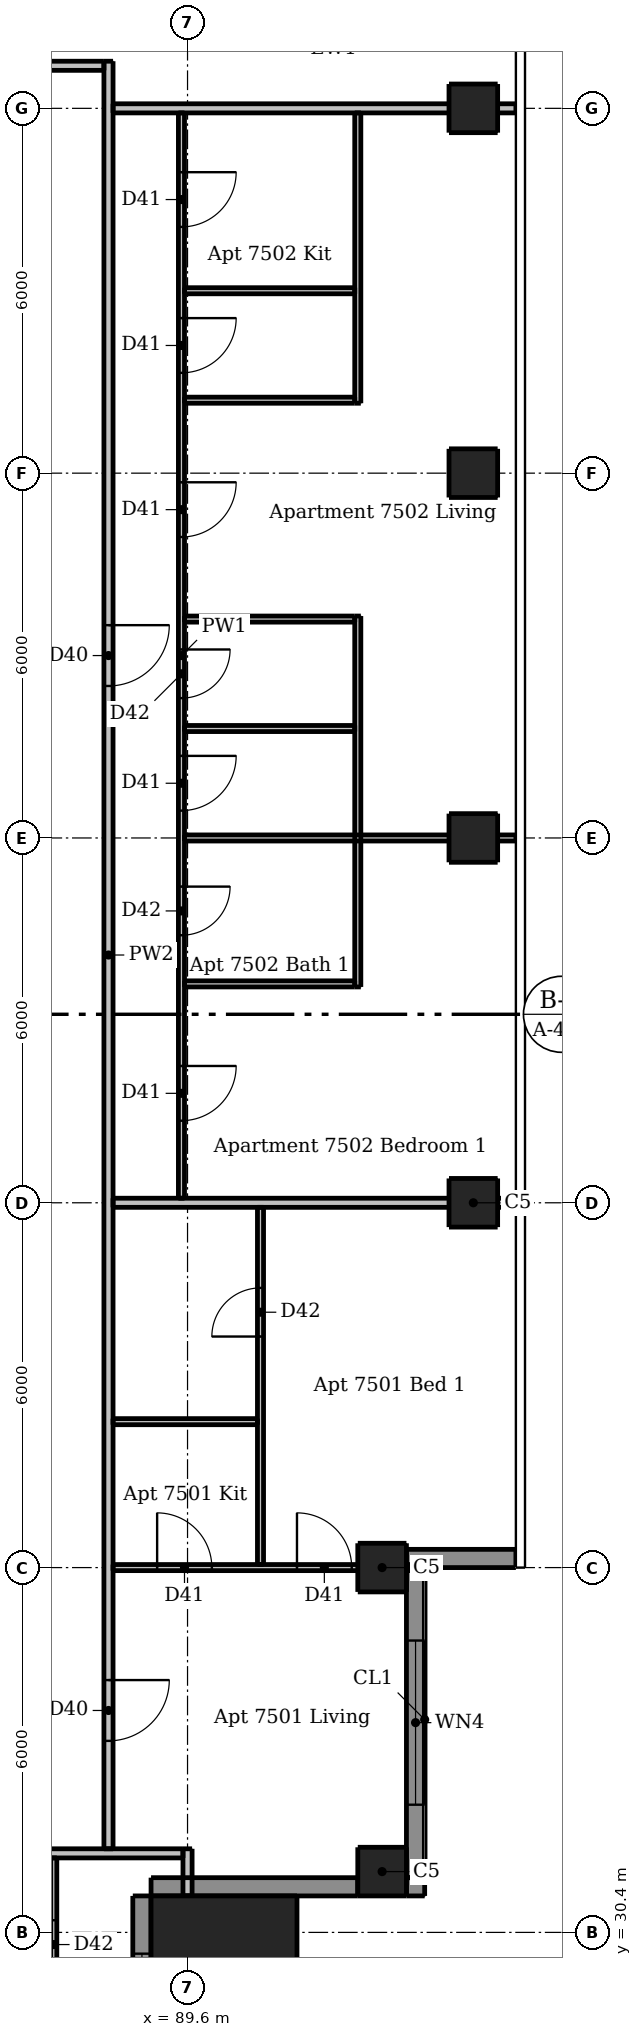
"""IFC4 building model, lengths in metres.
Left out: names, types, materials, properties, quantities, classifications, styles, units other than length and angle.
Written with IfcOpenShell. Run it as: python <this file> out.ifc"""

import sys

from ifc_helpers import new_model, si_unit, direction, frame, frame_2d, origin, origin_2d, place, context, subcontext, project, spatial, rectangle, extrude, element, fill, save


model = new_model("IFC4")
c1 = context("Model", 3, precision=1e-05, world=origin(), true_north=direction((0.0, 1.0)))
c2 = subcontext(c1, "Body", "Model", "MODEL_VIEW")
j1 = project(units=[si_unit("LENGTHUNIT", "METRE"), si_unit("PLANEANGLEUNIT", "RADIAN")], contexts=[c1])
p1 = place(None, origin())
s1 = spatial("IfcSite", under=j1, at=p1, CompositionType="ELEMENT")
p2 = place(p1, origin())
s2 = spatial("IfcBuilding", under=s1, at=p2, CompositionType="ELEMENT")
p3 = place(p2, frame((0.0, 0.0, 278.5)))
s3 = spatial("IfcBuildingStorey", under=s2, at=p3, CompositionType="ELEMENT", Elevation=278.5)
for number, where, z_axis, x_axis in (
    (1, (92.8, 31.4, 0.0), (0.0, 0.0, 1.0), (1.0, 0.0, 0.0)),
    (2, (92.8, 36.4, 0.0), (0.0, 0.0, 1.0), (1.0, 0.0, 0.0)),
    (3, (94.3, 42.4, 0.0), (0.0, 0.0, 1.0), (1.0, 0.0, 0.0)),
    (4, (94.3, 48.4, 0.0), (0.0, 0.0, 1.0), (1.0, 0.0, 0.0)),
    (5, (94.3, 54.4, 0.0), (0.0, 0.0, 1.0), (1.0, 0.0, 0.0)),
    (6, (94.3, 60.4, 0.0), (0.0, 0.0, 1.0), (1.0, 0.0, 0.0)),
):
    element("IfcColumn", number, at=place(p3, frame(where, z_axis=z_axis, x_axis=x_axis)), inside=s3, PredefinedType="COLUMN", context=c2, shape_type="SweptSolid", body=[
        extrude(rectangle(XDim=0.8, YDim=0.8, at=origin_2d()), origin(), (0.0, 0.0, 1.0), 3.0),
    ])
p4 = place(p3, frame((90.2, 29.8, 0.0), z_axis=(0.0, 0.0, 1.0), x_axis=(1.0, 0.0, 0.0)))
e7 = element("IfcColumn", 7, at=p4, inside=s3, PredefinedType="COLUMN", context=c2, shape_type="SweptSolid", body=[
    extrude(rectangle(XDim=2.4, YDim=2.4, at=origin_2d()), origin(), (0.0, 0.0, 1.0), 3.3),
])
p5 = place(p3, frame((88.85, 27.6, 0.0), z_axis=(0.0, 0.0, 1.0), x_axis=(0.0, 1.0, 0.0)))
e8 = element("IfcWall", 8, at=p5, inside=s3, PredefinedType="SOLIDWALL", context=c2, shape_type="SweptSolid", body=[
    extrude(rectangle(XDim=3.4, YDim=0.3, at=frame_2d((1.7, 0.0))), origin(), (0.0, 0.0, 1.0), 3.0),
])
p6 = place(p5, frame((0.95, 0.0, 0.9)))
e9 = element("IfcOpeningElement", 9, at=p6, cuts=e8, PredefinedType="OPENING", context=c2, shape_type="SweptSolid", body=[
    extrude(rectangle(XDim=1.5, YDim=1.5, at=frame_2d((0.75, 0.75))), frame((0.0, 0.16, 0.0), z_axis=(0.0, -1.0, 0.0), x_axis=(1.0, 0.0, 0.0)), (0.0, 0.0, 1.0), 0.32),
])
p7 = place(p3, frame((89.0, 31.15, 0.0), z_axis=(0.0, 0.0, 1.0), x_axis=(1.0, 0.0, 0.0)))
e10 = element("IfcWall", 10, at=p7, inside=s3, PredefinedType="SOLIDWALL", context=c2, shape_type="SweptSolid", body=[
    extrude(rectangle(XDim=3.4, YDim=0.3, at=frame_2d((1.7, 0.0))), origin(), (0.0, 0.0, 1.0), 3.0),
])
p8 = place(p3, frame((93.2, 31.15, 0.0), z_axis=(0.0, 0.0, 1.0), x_axis=(1.0, 0.0, 0.0)))
e11 = element("IfcWall", 11, at=p8, inside=s3, PredefinedType="SOLIDWALL", context=c2, shape_type="SweptSolid", body=[
    extrude(rectangle(XDim=0.3, YDim=0.3, at=frame_2d((0.15, 0.0))), origin(), (0.0, 0.0, 1.0), 3.0),
])
p9 = place(p3, frame((93.2, 36.55, 0.0), z_axis=(0.0, 0.0, 1.0), x_axis=(1.0, 0.0, 0.0)))
e12 = element("IfcWall", 12, at=p9, inside=s3, PredefinedType="SOLIDWALL", context=c2, shape_type="SweptSolid", body=[
    extrude(rectangle(XDim=1.8, YDim=0.3, at=frame_2d((0.9, 0.0))), origin(), (0.0, 0.0, 1.0), 3.0),
])
p10 = place(p3, frame((93.35, 31.3, 0.0), z_axis=(0.0, 0.0, 1.0), x_axis=(0.0, 1.0, 0.0)))
e13 = element("IfcWall", 13, at=p10, inside=s3, PredefinedType="SOLIDWALL", context=c2, shape_type="SweptSolid", body=[
    extrude(rectangle(XDim=5.1, YDim=0.3, at=frame_2d((2.55, 0.0))), origin(), (0.0, 0.0, 1.0), 3.0),
])
p11 = place(p10, frame((1.2, 0.0, 0.15)))
e14 = element("IfcOpeningElement", 14, at=p11, cuts=e13, PredefinedType="OPENING", context=c2, shape_type="SweptSolid", body=[
    extrude(rectangle(XDim=2.7, YDim=2.1, at=frame_2d((1.35, 1.05))), frame((0.0, 0.16, 0.0), z_axis=(0.0, -1.0, 0.0), x_axis=(1.0, 0.0, 0.0)), (0.0, 0.0, 1.0), 0.32),
])
p12 = place(p3, frame((87.4, 28.65, 0.0), z_axis=(0.0, 0.0, 1.0), x_axis=(0.0, 1.0, 0.0)))
e15 = element("IfcWall", 15, at=p12, inside=s3, PredefinedType="PARTITIONING", context=c2, shape_type="SweptSolid", body=[
    extrude(rectangle(XDim=2.975, YDim=0.1, at=frame_2d((1.488, 0.0))), origin(), (0.0, 0.0, 1.0), 3.0),
])
p13 = place(p12, frame((1.15, 0.0, 0.0)))
e16 = element("IfcOpeningElement", 16, at=p13, cuts=e15, PredefinedType="OPENING", context=c2, shape_type="SweptSolid", body=[
    extrude(rectangle(XDim=0.8, YDim=2.1, at=frame_2d((0.4, 1.05))), frame((0.0, 0.06, 0.0), z_axis=(0.0, -1.0, 0.0), x_axis=(1.0, 0.0, 0.0)), (0.0, 0.0, 1.0), 0.12),
])
p14 = place(p3, frame((89.5, 60.325, 0.0), z_axis=(0.0, 0.0, 1.0), x_axis=(0.0, -1.0, 0.0)))
e17 = element("IfcWall", 17, at=p14, inside=s3, PredefinedType="PARTITIONING", context=c2, shape_type="SweptSolid", body=[
    extrude(rectangle(XDim=17.85, YDim=0.1, at=frame_2d((8.925, 0.0))), origin(), (0.0, 0.0, 1.0), 3.0),
])
p15 = place(p14, frame((6.075, 0.0, 0.0)))
e18 = element("IfcOpeningElement", 18, at=p15, cuts=e17, PredefinedType="OPENING", context=c2, shape_type="SweptSolid", body=[
    extrude(rectangle(XDim=0.9, YDim=2.1, at=frame_2d((0.45, 1.05))), frame((0.0, 0.06, 0.0), z_axis=(0.0, -1.0, 0.0), x_axis=(1.0, 0.0, 0.0)), (0.0, 0.0, 1.0), 0.12),
])
p16 = place(p14, frame((0.975, 0.0, 0.0)))
e19 = element("IfcOpeningElement", 19, at=p16, cuts=e17, PredefinedType="OPENING", context=c2, shape_type="SweptSolid", body=[
    extrude(rectangle(XDim=0.9, YDim=2.1, at=frame_2d((0.45, 1.05))), frame((0.0, 0.06, 0.0), z_axis=(0.0, -1.0, 0.0), x_axis=(1.0, 0.0, 0.0)), (0.0, 0.0, 1.0), 0.12),
])
p17 = place(p14, frame((3.375, 0.0, 0.0)))
e20 = element("IfcOpeningElement", 20, at=p17, cuts=e17, PredefinedType="OPENING", context=c2, shape_type="SweptSolid", body=[
    extrude(rectangle(XDim=0.9, YDim=2.1, at=frame_2d((0.45, 1.05))), frame((0.0, 0.06, 0.0), z_axis=(0.0, -1.0, 0.0), x_axis=(1.0, 0.0, 0.0)), (0.0, 0.0, 1.0), 0.12),
])
p18 = place(p14, frame((10.575, 0.0, 0.0)))
e21 = element("IfcOpeningElement", 21, at=p18, cuts=e17, PredefinedType="OPENING", context=c2, shape_type="SweptSolid", body=[
    extrude(rectangle(XDim=0.9, YDim=2.1, at=frame_2d((0.45, 1.05))), frame((0.0, 0.06, 0.0), z_axis=(0.0, -1.0, 0.0), x_axis=(1.0, 0.0, 0.0)), (0.0, 0.0, 1.0), 0.12),
])
p19 = place(p14, frame((8.825, 0.0, 0.0)))
e22 = element("IfcOpeningElement", 22, at=p19, cuts=e17, PredefinedType="OPENING", context=c2, shape_type="SweptSolid", body=[
    extrude(rectangle(XDim=0.8, YDim=2.1, at=frame_2d((0.4, 1.05))), frame((0.0, 0.06, 0.0), z_axis=(0.0, -1.0, 0.0), x_axis=(1.0, 0.0, 0.0)), (0.0, 0.0, 1.0), 0.12),
])
p20 = place(p14, frame((15.675, 0.0, 0.0)))
e23 = element("IfcOpeningElement", 23, at=p20, cuts=e17, PredefinedType="OPENING", context=c2, shape_type="SweptSolid", body=[
    extrude(rectangle(XDim=0.9, YDim=2.1, at=frame_2d((0.45, 1.05))), frame((0.0, 0.06, 0.0), z_axis=(0.0, -1.0, 0.0), x_axis=(1.0, 0.0, 0.0)), (0.0, 0.0, 1.0), 0.12),
])
p21 = place(p14, frame((12.725, 0.0, 0.0)))
e24 = element("IfcOpeningElement", 24, at=p21, cuts=e17, PredefinedType="OPENING", context=c2, shape_type="SweptSolid", body=[
    extrude(rectangle(XDim=0.8, YDim=2.1, at=frame_2d((0.4, 1.05))), frame((0.0, 0.06, 0.0), z_axis=(0.0, -1.0, 0.0), x_axis=(1.0, 0.0, 0.0)), (0.0, 0.0, 1.0), 0.12),
])
p22 = place(p3, frame((90.8, 36.45, 0.0), z_axis=(0.0, 0.0, 1.0), x_axis=(0.0, 1.0, 0.0)))
e25 = element("IfcWall", 25, at=p22, inside=s3, PredefinedType="PARTITIONING", context=c2, shape_type="SweptSolid", body=[
    extrude(rectangle(XDim=5.875, YDim=0.1, at=frame_2d((2.938, 0.0))), origin(), (0.0, 0.0, 1.0), 3.0),
])
p23 = place(p22, frame((3.75, 0.0, 0.0)))
e26 = element("IfcOpeningElement", 26, at=p23, cuts=e25, PredefinedType="OPENING", context=c2, shape_type="SweptSolid", body=[
    extrude(rectangle(XDim=0.8, YDim=2.1, at=frame_2d((0.4, 1.05))), frame((0.0, 0.06, 0.0), z_axis=(0.0, -1.0, 0.0), x_axis=(1.0, 0.0, 0.0)), (0.0, 0.0, 1.0), 0.12),
])
p24 = place(p3, frame((92.4, 45.95, 0.0), z_axis=(0.0, 0.0, 1.0), x_axis=(0.0, 1.0, 0.0)))
e27 = element("IfcWall", 27, at=p24, inside=s3, PredefinedType="PARTITIONING", context=c2, shape_type="SweptSolid", body=[
    extrude(rectangle(XDim=6.1, YDim=0.1, at=frame_2d((3.05, 0.0))), origin(), (0.0, 0.0, 1.0), 3.0),
])
p25 = place(p3, frame((92.4, 55.55, 0.0), z_axis=(0.0, 0.0, 1.0), x_axis=(0.0, 1.0, 0.0)))
e28 = element("IfcWall", 28, at=p25, inside=s3, PredefinedType="PARTITIONING", context=c2, shape_type="SweptSolid", body=[
    extrude(rectangle(XDim=4.775, YDim=0.1, at=frame_2d((2.387, 0.0))), origin(), (0.0, 0.0, 1.0), 3.0),
])
for number, where, z_axis, x_axis in (
    (29, (89.55, 57.4, 0.0), (0.0, 0.0, 1.0), (1.0, 0.0, 0.0)),
    (30, (89.55, 55.6, 0.0), (0.0, 0.0, 1.0), (1.0, 0.0, 0.0)),
    (31, (89.55, 52.0, 0.0), (0.0, 0.0, 1.0), (1.0, 0.0, 0.0)),
    (32, (89.55, 50.2, 0.0), (0.0, 0.0, 1.0), (1.0, 0.0, 0.0)),
):
    element("IfcWall", number, at=place(p3, frame(where, z_axis=z_axis, x_axis=x_axis)), inside=s3, PredefinedType="PARTITIONING", context=c2, shape_type="SweptSolid", body=[
        extrude(rectangle(XDim=2.8, YDim=0.1, at=frame_2d((1.4, 0.0))), origin(), (0.0, 0.0, 1.0), 3.0),
    ])
p26 = place(p3, frame((89.55, 48.4, 0.0), z_axis=(0.0, 0.0, 1.0), x_axis=(1.0, 0.0, 0.0)))
e33 = element("IfcWall", 33, at=p26, inside=s3, PredefinedType="PARTITIONING", context=c2, shape_type="SweptSolid", body=[
    extrude(rectangle(XDim=5.45, YDim=0.1, at=frame_2d((2.725, 0.0))), origin(), (0.0, 0.0, 1.0), 2.539),
])
p27 = place(p3, frame((89.55, 46.0, 0.0), z_axis=(0.0, 0.0, 1.0), x_axis=(1.0, 0.0, 0.0)))
e34 = element("IfcWall", 34, at=p27, inside=s3, PredefinedType="PARTITIONING", context=c2, shape_type="SweptSolid", body=[
    extrude(rectangle(XDim=2.8, YDim=0.1, at=frame_2d((1.4, 0.0))), origin(), (0.0, 0.0, 1.0), 3.0),
])
p28 = place(p3, frame((88.375, 38.8, 0.0), z_axis=(0.0, 0.0, 1.0), x_axis=(1.0, 0.0, 0.0)))
e35 = element("IfcWall", 35, at=p28, inside=s3, PredefinedType="PARTITIONING", context=c2, shape_type="SweptSolid", body=[
    extrude(rectangle(XDim=2.375, YDim=0.1, at=frame_2d((1.188, 0.0))), origin(), (0.0, 0.0, 1.0), 3.0),
])
p29 = place(p3, frame((88.375, 36.4, 0.0), z_axis=(0.0, 0.0, 1.0), x_axis=(1.0, 0.0, 0.0)))
e36 = element("IfcWall", 36, at=p29, inside=s3, PredefinedType="PARTITIONING", context=c2, shape_type="SweptSolid", body=[
    extrude(rectangle(XDim=5.125, YDim=0.1, at=frame_2d((2.562, 0.0))), origin(), (0.0, 0.0, 1.0), 2.597),
])
p30 = place(p29, frame((0.725, 0.0, 0.0)))
e37 = element("IfcOpeningElement", 37, at=p30, cuts=e36, PredefinedType="OPENING", context=c2, shape_type="SweptSolid", body=[
    extrude(rectangle(XDim=0.9, YDim=2.1, at=frame_2d((0.45, 1.05))), frame((0.0, 0.06, 0.0), z_axis=(0.0, -1.0, 0.0), x_axis=(1.0, 0.0, 0.0)), (0.0, 0.0, 1.0), 0.12),
])
p31 = place(p29, frame((3.025, 0.0, 0.0)))
e38 = element("IfcOpeningElement", 38, at=p31, cuts=e36, PredefinedType="OPENING", context=c2, shape_type="SweptSolid", body=[
    extrude(rectangle(XDim=0.9, YDim=2.1, at=frame_2d((0.45, 1.05))), frame((0.0, 0.06, 0.0), z_axis=(0.0, -1.0, 0.0), x_axis=(1.0, 0.0, 0.0)), (0.0, 0.0, 1.0), 0.12),
])
p32 = place(p3, frame((88.3, 61.175, 0.0), z_axis=(0.0, 0.0, 1.0), x_axis=(0.0, -1.0, 0.0)))
e39 = element("IfcWall", 39, at=p32, inside=s3, PredefinedType="PARTITIONING", context=c2, shape_type="SweptSolid", body=[
    extrude(rectangle(XDim=29.4, YDim=0.15, at=frame_2d((14.7, 0.0))), origin(), (0.0, 0.0, 1.0), 3.0),
])
p33 = place(p32, frame((26.625, 0.0, 0.0)))
e40 = element("IfcOpeningElement", 40, at=p33, cuts=e39, PredefinedType="OPENING", context=c2, shape_type="SweptSolid", body=[
    extrude(rectangle(XDim=1.0, YDim=2.1, at=frame_2d((0.5, 1.05))), frame((0.0, 0.085, 0.0), z_axis=(0.0, -1.0, 0.0), x_axis=(1.0, 0.0, 0.0)), (0.0, 0.0, 1.0), 0.17),
])
p34 = place(p32, frame((9.275, 0.0, 0.0)))
e41 = element("IfcOpeningElement", 41, at=p34, cuts=e39, PredefinedType="OPENING", context=c2, shape_type="SweptSolid", body=[
    extrude(rectangle(XDim=1.0, YDim=2.1, at=frame_2d((0.5, 1.05))), frame((0.0, 0.085, 0.0), z_axis=(0.0, -1.0, 0.0), x_axis=(1.0, 0.0, 0.0)), (0.0, 0.0, 1.0), 0.17),
])
p35 = place(p3, frame((89.6, 31.0, 0.0), z_axis=(0.0, 0.0, 1.0), x_axis=(0.0, 1.0, 0.0)))
e42 = element("IfcWall", 42, at=p35, inside=s3, PredefinedType="PARTITIONING", context=c2, shape_type="SweptSolid", body=[
    extrude(rectangle(XDim=0.775, YDim=0.15, at=frame_2d((0.387, 0.0))), origin(), (0.0, 0.0, 1.0), 3.0),
])
p36 = place(p3, frame((58.975, 61.1, 0.0), z_axis=(0.0, 0.0, 1.0), x_axis=(1.0, 0.0, 0.0)))
e43 = element("IfcWall", 43, at=p36, inside=s3, PredefinedType="PARTITIONING", context=c2, shape_type="SweptSolid", body=[
    extrude(rectangle(XDim=29.25, YDim=0.15, at=frame_2d((14.625, 0.0))), origin(), (0.0, 0.0, 1.0), 3.0),
])
p37 = place(p36, frame((9.125, 0.0, 0.0)))
e44 = element("IfcOpeningElement", 44, at=p37, cuts=e43, PredefinedType="OPENING", context=c2, shape_type="SweptSolid", body=[
    extrude(rectangle(XDim=1.0, YDim=2.1, at=frame_2d((0.5, 1.05))), frame((0.0, 0.085, 0.0), z_axis=(0.0, -1.0, 0.0), x_axis=(1.0, 0.0, 0.0)), (0.0, 0.0, 1.0), 0.17),
])
p38 = place(p36, frame((26.475, 0.0, 0.0)))
e45 = element("IfcOpeningElement", 45, at=p38, cuts=e43, PredefinedType="OPENING", context=c2, shape_type="SweptSolid", body=[
    extrude(rectangle(XDim=1.0, YDim=2.1, at=frame_2d((0.5, 1.05))), frame((0.0, 0.085, 0.0), z_axis=(0.0, -1.0, 0.0), x_axis=(1.0, 0.0, 0.0)), (0.0, 0.0, 1.0), 0.17),
])
p39 = place(p3, frame((88.375, 60.4, 0.0), z_axis=(0.0, 0.0, 1.0), x_axis=(1.0, 0.0, 0.0)))
e46 = element("IfcWall", 46, at=p39, inside=s3, PredefinedType="PARTITIONING", context=c2, shape_type="SweptSolid", body=[
    extrude(rectangle(XDim=6.625, YDim=0.15, at=frame_2d((3.312, 0.0))), origin(), (0.0, 0.0, 1.0), 2.597),
])
p40 = place(p3, frame((88.375, 42.4, 0.0), z_axis=(0.0, 0.0, 1.0), x_axis=(1.0, 0.0, 0.0)))
e47 = element("IfcWall", 47, at=p40, inside=s3, PredefinedType="PARTITIONING", context=c2, shape_type="SweptSolid", body=[
    extrude(rectangle(XDim=6.625, YDim=0.15, at=frame_2d((3.312, 0.0))), origin(), (0.0, 0.0, 1.0), 2.539),
])
p41 = place(p3, frame((89.525, 31.7, 0.0), z_axis=(0.0, 0.0, 1.0), x_axis=(-1.0, 0.0, 0.0)))
e48 = element("IfcWall", 48, at=p41, inside=s3, PredefinedType="PARTITIONING", context=c2, shape_type="SweptSolid", body=[
    extrude(rectangle(XDim=30.55, YDim=0.15, at=frame_2d((15.275, 0.0))), origin(), (0.0, 0.0, 1.0), 3.0),
])
p42 = place(p41, frame((18.425, 0.0, 0.0)))
e49 = element("IfcOpeningElement", 49, at=p42, cuts=e48, PredefinedType="OPENING", context=c2, shape_type="SweptSolid", body=[
    extrude(rectangle(XDim=1.0, YDim=2.1, at=frame_2d((0.5, 1.05))), frame((0.0, 0.085, 0.0), z_axis=(0.0, -1.0, 0.0), x_axis=(1.0, 0.0, 0.0)), (0.0, 0.0, 1.0), 0.17),
])
p43 = place(p6, origin())
e50 = element("IfcWindow", 50, at=p43, inside=s3, PartitioningType="DOUBLE_PANEL_VERTICAL", PredefinedType="WINDOW", context=c2, shape_type="SweptSolid", body=[
    extrude(rectangle(XDim=1.5, YDim=1.5, at=frame_2d((0.75, 0.75))), frame((0.0, 0.03, 0.0), z_axis=(0.0, -1.0, 0.0), x_axis=(1.0, 0.0, 0.0)), (0.0, 0.0, 1.0), 0.06),
])
fill(e9, e50)
p44 = place(p11, origin())
e51 = element("IfcWindow", 51, at=p44, inside=s3, PartitioningType="DOUBLE_PANEL_VERTICAL", PredefinedType="WINDOW", context=c2, shape_type="SweptSolid", body=[
    extrude(rectangle(XDim=2.7, YDim=2.1, at=frame_2d((1.35, 1.05))), frame((0.0, 0.03, 0.0), z_axis=(0.0, -1.0, 0.0), x_axis=(1.0, 0.0, 0.0)), (0.0, 0.0, 1.0), 0.06),
])
fill(e14, e51)
p45 = place(p13, origin())
e52 = element("IfcDoor", 52, at=p45, inside=s3, OperationType="SINGLE_SWING_LEFT", PredefinedType="DOOR", context=c2, shape_type="SweptSolid", body=[
    extrude(rectangle(XDim=0.8, YDim=2.1, at=frame_2d((0.4, 1.05))), frame((0.0, 0.025, 0.0), z_axis=(0.0, -1.0, 0.0), x_axis=(1.0, 0.0, 0.0)), (0.0, 0.0, 1.0), 0.05),
])
fill(e16, e52)
p46 = place(p33, origin())
e53 = element("IfcDoor", 53, at=p46, inside=s3, OperationType="SINGLE_SWING_LEFT", PredefinedType="DOOR", context=c2, shape_type="SweptSolid", body=[
    extrude(rectangle(XDim=1.0, YDim=2.1, at=frame_2d((0.5, 1.05))), frame((0.0, 0.025, 0.0), z_axis=(0.0, -1.0, 0.0), x_axis=(1.0, 0.0, 0.0)), (0.0, 0.0, 1.0), 0.05),
])
fill(e40, e53)
p47 = place(p30, origin())
e54 = element("IfcDoor", 54, at=p47, inside=s3, OperationType="SINGLE_SWING_LEFT", PredefinedType="DOOR", context=c2, shape_type="SweptSolid", body=[
    extrude(rectangle(XDim=0.9, YDim=2.1, at=frame_2d((0.45, 1.05))), frame((0.0, 0.025, 0.0), z_axis=(0.0, -1.0, 0.0), x_axis=(1.0, 0.0, 0.0)), (0.0, 0.0, 1.0), 0.05),
])
fill(e37, e54)
p48 = place(p31, origin())
e55 = element("IfcDoor", 55, at=p48, inside=s3, OperationType="SINGLE_SWING_LEFT", PredefinedType="DOOR", context=c2, shape_type="SweptSolid", body=[
    extrude(rectangle(XDim=0.9, YDim=2.1, at=frame_2d((0.45, 1.05))), frame((0.0, 0.025, 0.0), z_axis=(0.0, -1.0, 0.0), x_axis=(1.0, 0.0, 0.0)), (0.0, 0.0, 1.0), 0.05),
])
fill(e38, e55)
p49 = place(p23, origin())
e56 = element("IfcDoor", 56, at=p49, inside=s3, OperationType="SINGLE_SWING_LEFT", PredefinedType="DOOR", context=c2, shape_type="SweptSolid", body=[
    extrude(rectangle(XDim=0.8, YDim=2.1, at=frame_2d((0.4, 1.05))), frame((0.0, 0.025, 0.0), z_axis=(0.0, -1.0, 0.0), x_axis=(1.0, 0.0, 0.0)), (0.0, 0.0, 1.0), 0.05),
])
fill(e26, e56)
p50 = place(p34, origin())
e57 = element("IfcDoor", 57, at=p50, inside=s3, OperationType="SINGLE_SWING_LEFT", PredefinedType="DOOR", context=c2, shape_type="SweptSolid", body=[
    extrude(rectangle(XDim=1.0, YDim=2.1, at=frame_2d((0.5, 1.05))), frame((0.0, 0.025, 0.0), z_axis=(0.0, -1.0, 0.0), x_axis=(1.0, 0.0, 0.0)), (0.0, 0.0, 1.0), 0.05),
])
fill(e41, e57)
p51 = place(p15, origin())
e58 = element("IfcDoor", 58, at=p51, inside=s3, OperationType="SINGLE_SWING_LEFT", PredefinedType="DOOR", context=c2, shape_type="SweptSolid", body=[
    extrude(rectangle(XDim=0.9, YDim=2.1, at=frame_2d((0.45, 1.05))), frame((0.0, 0.025, 0.0), z_axis=(0.0, -1.0, 0.0), x_axis=(1.0, 0.0, 0.0)), (0.0, 0.0, 1.0), 0.05),
])
fill(e18, e58)
p52 = place(p16, origin())
e59 = element("IfcDoor", 59, at=p52, inside=s3, OperationType="SINGLE_SWING_LEFT", PredefinedType="DOOR", context=c2, shape_type="SweptSolid", body=[
    extrude(rectangle(XDim=0.9, YDim=2.1, at=frame_2d((0.45, 1.05))), frame((0.0, 0.025, 0.0), z_axis=(0.0, -1.0, 0.0), x_axis=(1.0, 0.0, 0.0)), (0.0, 0.0, 1.0), 0.05),
])
fill(e19, e59)
p53 = place(p17, origin())
e60 = element("IfcDoor", 60, at=p53, inside=s3, OperationType="SINGLE_SWING_LEFT", PredefinedType="DOOR", context=c2, shape_type="SweptSolid", body=[
    extrude(rectangle(XDim=0.9, YDim=2.1, at=frame_2d((0.45, 1.05))), frame((0.0, 0.025, 0.0), z_axis=(0.0, -1.0, 0.0), x_axis=(1.0, 0.0, 0.0)), (0.0, 0.0, 1.0), 0.05),
])
fill(e20, e60)
p54 = place(p18, origin())
e61 = element("IfcDoor", 61, at=p54, inside=s3, OperationType="SINGLE_SWING_LEFT", PredefinedType="DOOR", context=c2, shape_type="SweptSolid", body=[
    extrude(rectangle(XDim=0.9, YDim=2.1, at=frame_2d((0.45, 1.05))), frame((0.0, 0.025, 0.0), z_axis=(0.0, -1.0, 0.0), x_axis=(1.0, 0.0, 0.0)), (0.0, 0.0, 1.0), 0.05),
])
fill(e21, e61)
p55 = place(p19, origin())
e62 = element("IfcDoor", 62, at=p55, inside=s3, OperationType="SINGLE_SWING_LEFT", PredefinedType="DOOR", context=c2, shape_type="SweptSolid", body=[
    extrude(rectangle(XDim=0.8, YDim=2.1, at=frame_2d((0.4, 1.05))), frame((0.0, 0.025, 0.0), z_axis=(0.0, -1.0, 0.0), x_axis=(1.0, 0.0, 0.0)), (0.0, 0.0, 1.0), 0.05),
])
fill(e22, e62)
p56 = place(p20, origin())
e63 = element("IfcDoor", 63, at=p56, inside=s3, OperationType="SINGLE_SWING_LEFT", PredefinedType="DOOR", context=c2, shape_type="SweptSolid", body=[
    extrude(rectangle(XDim=0.9, YDim=2.1, at=frame_2d((0.45, 1.05))), frame((0.0, 0.025, 0.0), z_axis=(0.0, -1.0, 0.0), x_axis=(1.0, 0.0, 0.0)), (0.0, 0.0, 1.0), 0.05),
])
fill(e23, e63)
p57 = place(p21, origin())
e64 = element("IfcDoor", 64, at=p57, inside=s3, OperationType="SINGLE_SWING_LEFT", PredefinedType="DOOR", context=c2, shape_type="SweptSolid", body=[
    extrude(rectangle(XDim=0.8, YDim=2.1, at=frame_2d((0.4, 1.05))), frame((0.0, 0.025, 0.0), z_axis=(0.0, -1.0, 0.0), x_axis=(1.0, 0.0, 0.0)), (0.0, 0.0, 1.0), 0.05),
])
fill(e24, e64)
save(model, sys.argv[1])
